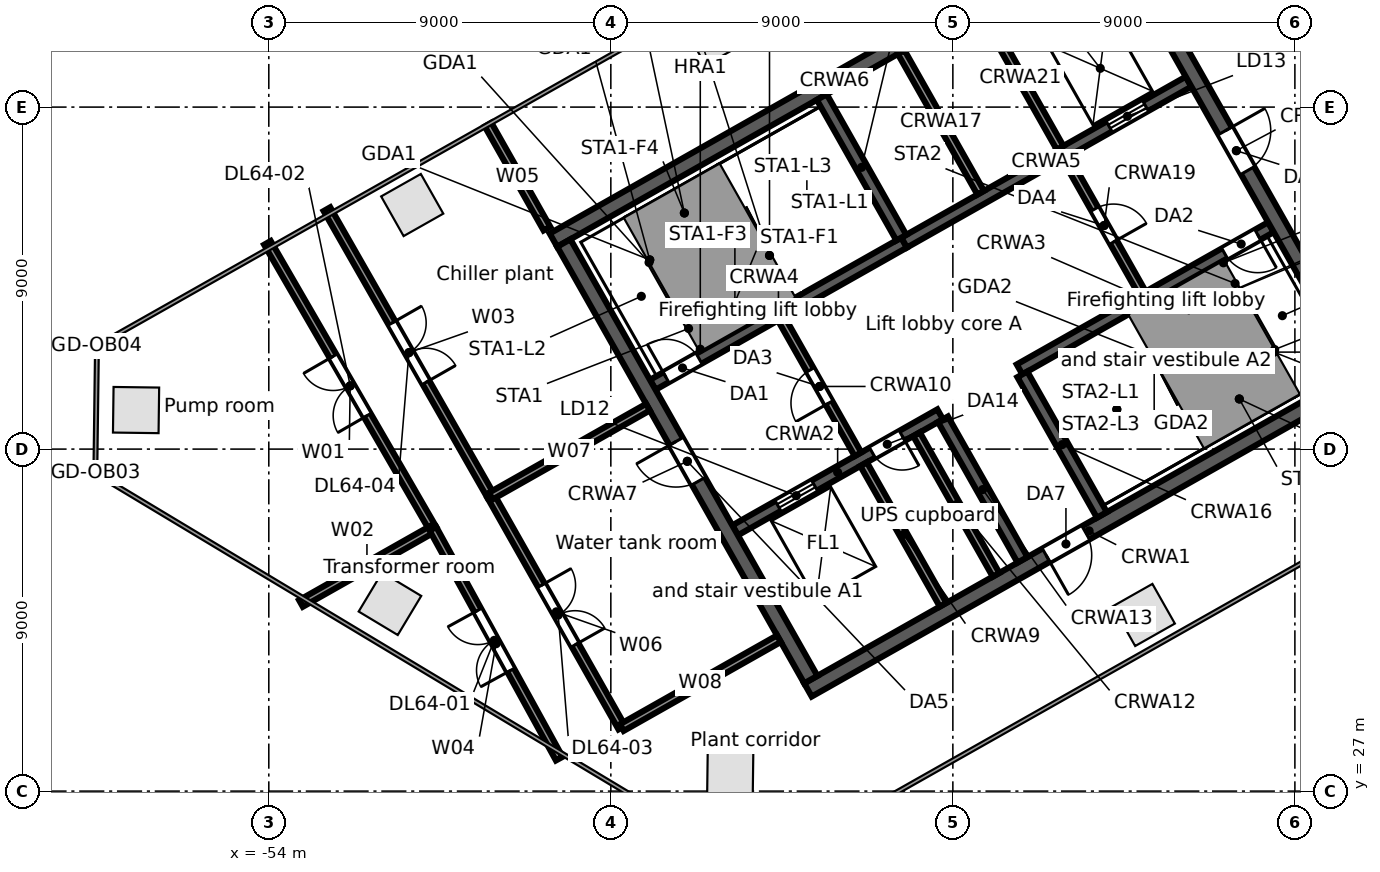
"""IFC4 building model, lengths in metres.
Left out: names, types, materials, properties, quantities, classifications, styles, units other than length and angle.
Written with IfcOpenShell. Run it as: python <this file> out.ifc"""

import sys

from ifc_helpers import new_model, si_unit, direction, frame, frame_2d, origin, origin_2d, place, context, subcontext, project, spatial, rectangle, extrude, element, fill, save


model = new_model("IFC4")
c1 = context("Model", 3, precision=1e-05, world=origin(), true_north=direction((0.0, 1.0)))
c2 = subcontext(c1, "Body", "Model", "MODEL_VIEW")
j1 = project(units=[si_unit("LENGTHUNIT", "METRE"), si_unit("PLANEANGLEUNIT", "RADIAN")], contexts=[c1])
p1 = place(None, origin())
s1 = spatial("IfcSite", under=j1, at=p1, CompositionType="ELEMENT")
p2 = place(p1, origin())
s2 = spatial("IfcBuilding", under=s1, at=p2, CompositionType="ELEMENT")
p3 = place(p2, frame((0.0, 0.0, 285.5)))
s3 = spatial("IfcBuildingStorey", under=s2, at=p3, CompositionType="ELEMENT", Elevation=285.5)
for number, where, z_axis, x_axis in (
    (1, (-42.28, 46.919, 0.0), (0.0, 0.0, 1.0), (-0.87, -0.492, 0.0)),
    (2, (-50.226, 42.423, 0.0), (0.0, 0.0, 1.0), (-0.87, -0.492, 0.0)),
    (3, (-57.493, 37.027, 0.0), (0.0, 0.0, 1.0), (-0.013, -1.0, 0.0)),
    (4, (-50.812, 31.931, 0.0), (0.0, 0.0, 1.0), (0.857, -0.515, 0.0)),
    (5, (-41.858, 27.495, 0.0), (0.0, 0.0, 1.0), (1.0, -0.013, 0.0)),
    (6, (-30.976, 31.635, 0.0), (0.0, 0.0, 1.0), (0.87, 0.492, 0.0)),
):
    element("IfcColumn", number, at=place(p3, frame(where, z_axis=z_axis, x_axis=x_axis)), inside=s3, PredefinedType="COLUMN", context=c2, shape_type="SweptSolid", body=[
        extrude(rectangle(XDim=1.2, YDim=1.2, at=origin_2d()), origin(), (0.0, 0.0, 1.0), 7.6),
    ])
p4 = place(p3, frame((-39.813, 29.662, 0.0), z_axis=(0.0, 0.0, 1.0), x_axis=(0.870350116061, 0.492433422375, 0.0)))
e7 = element("IfcWall", 7, at=p4, inside=s3, PredefinedType="SOLIDWALL", context=c2, shape_type="SweptSolid", body=[
    extrude(rectangle(XDim=17.0, YDim=0.4, at=frame_2d((8.5, 0.0))), origin(), (0.0, 0.0, 1.0), 7.32),
])
p5 = place(p4, frame((7.2, 0.0, 0.0)))
e8 = element("IfcOpeningElement", 8, at=p5, cuts=e7, PredefinedType="OPENING", context=c2, shape_type="SweptSolid", body=[
    extrude(rectangle(XDim=1.2, YDim=2.1, at=frame_2d((0.6, 1.05))), frame((0.0, 0.21, 0.0), z_axis=(0.0, -1.0, 0.0), x_axis=(1.0, 0.0, 0.0)), (0.0, 0.0, 1.0), 0.42),
])
p6 = place(p3, frame((-41.73, 33.863, 0.0), z_axis=(0.0, 0.0, 1.0), x_axis=(0.870350800578, 0.492432212525, 0.0)))
e9 = element("IfcWall", 9, at=p6, inside=s3, PredefinedType="SOLIDWALL", context=c2, shape_type="SweptSolid", body=[
    extrude(rectangle(XDim=6.2, YDim=0.3, at=frame_2d((3.1, 0.0))), origin(), (0.0, 0.0, 1.0), 7.32),
])
p7 = place(p6, frame((1.3, 0.0, 0.0)))
e10 = element("IfcOpeningElement", 10, at=p7, cuts=e9, PredefinedType="OPENING", context=c2, shape_type="SweptSolid", body=[
    extrude(rectangle(XDim=1.1, YDim=2.1, at=frame_2d((0.55, 1.05))), frame((0.0, 0.16, 0.0), z_axis=(0.0, -1.0, 0.0), x_axis=(1.0, 0.0, 0.0)), (0.0, 0.0, 1.0), 0.32),
])
p8 = place(p6, frame((4.15, 0.0, 0.0)))
e11 = element("IfcOpeningElement", 11, at=p8, cuts=e9, PredefinedType="OPENING", context=c2, shape_type="SweptSolid", body=[
    extrude(rectangle(XDim=0.9, YDim=2.1, at=frame_2d((0.45, 1.05))), frame((0.0, 0.16, 0.0), z_axis=(0.0, -1.0, 0.0), x_axis=(1.0, 0.0, 0.0)), (0.0, 0.0, 1.0), 0.32),
])
p9 = place(p3, frame((-34.245, 38.097, 0.0), z_axis=(0.0, 0.0, 1.0), x_axis=(0.870356351998, 0.492422400523, 0.0)))
e12 = element("IfcWall", 12, at=p9, inside=s3, PredefinedType="SOLIDWALL", context=c2, shape_type="SweptSolid", body=[
    extrude(rectangle(XDim=7.6, YDim=0.3, at=frame_2d((3.8, 0.0))), origin(), (0.0, 0.0, 1.0), 7.32),
])
p10 = place(p9, frame((6.2, 0.0, 0.0)))
e13 = element("IfcOpeningElement", 13, at=p10, cuts=e12, PredefinedType="OPENING", context=c2, shape_type="SweptSolid", body=[
    extrude(rectangle(XDim=1.0, YDim=2.1, at=frame_2d((0.5, 1.05))), frame((0.0, 0.16, 0.0), z_axis=(0.0, -1.0, 0.0), x_axis=(1.0, 0.0, 0.0)), (0.0, 0.0, 1.0), 0.32),
])
p11 = place(p3, frame((-43.897, 37.692, 0.0), z_axis=(0.0, 0.0, 1.0), x_axis=(0.870356351998, 0.492422400523, 0.0)))
e14 = element("IfcWall", 14, at=p11, inside=s3, PredefinedType="SOLIDWALL", context=c2, shape_type="SweptSolid", body=[
    extrude(rectangle(XDim=7.6, YDim=0.3, at=frame_2d((3.8, 0.0))), origin(), (0.0, 0.0, 1.0), 7.32),
])
p12 = place(p11, frame((0.4, 0.0, 0.0)))
e15 = element("IfcOpeningElement", 15, at=p12, cuts=e14, PredefinedType="OPENING", context=c2, shape_type="SweptSolid", body=[
    extrude(rectangle(XDim=1.0, YDim=2.1, at=frame_2d((0.5, 1.05))), frame((0.0, 0.16, 0.0), z_axis=(0.0, -1.0, 0.0), x_axis=(1.0, 0.0, 0.0)), (0.0, 0.0, 1.0), 0.32),
])
p13 = place(p3, frame((-37.282, 41.435, 0.0), z_axis=(0.0, 0.0, 1.0), x_axis=(0.870361315115, 0.492413628113, 0.0)))
e16 = element("IfcWall", 16, at=p13, inside=s3, PredefinedType="SOLIDWALL", context=c2, shape_type="SweptSolid", body=[
    extrude(rectangle(XDim=8.6, YDim=0.3, at=frame_2d((4.3, 0.0))), origin(), (0.0, 0.0, 1.0), 7.32),
])
p14 = place(p13, frame((6.2, 0.0, 0.0)))
e17 = element("IfcOpeningElement", 17, at=p14, cuts=e16, PredefinedType="OPENING", context=c2, shape_type="SweptSolid", body=[
    extrude(rectangle(XDim=1.1, YDim=2.1, at=frame_2d((0.55, 1.05))), frame((0.0, 0.16, 0.0), z_axis=(0.0, -1.0, 0.0), x_axis=(1.0, 0.0, 0.0)), (0.0, 0.0, 1.0), 0.32),
])
p15 = place(p3, frame((-46.51, 41.499, 0.0), z_axis=(0.0, 0.0, 1.0), x_axis=(0.870356271124, 0.492422543467, 0.0)))
e18 = element("IfcWall", 18, at=p15, inside=s3, PredefinedType="SOLIDWALL", context=c2, shape_type="SweptSolid", body=[
    extrude(rectangle(XDim=17.0, YDim=0.4, at=frame_2d((8.5, 0.0))), origin(), (0.0, 0.0, 1.0), 7.32),
])
p16 = place(p3, frame((-46.238, 41.423, 0.0), z_axis=(0.0, 0.0, 1.0), x_axis=(0.492421663121, -0.870356769198, 0.0)))
e19 = element("IfcWall", 19, at=p16, inside=s3, PredefinedType="SOLIDWALL", context=c2, shape_type="SweptSolid", body=[
    extrude(rectangle(XDim=13.2, YDim=0.4, at=frame_2d((6.6, 0.0))), origin(), (0.0, 0.0, 1.0), 7.32),
])
p17 = place(p16, frame((6.0, 0.0, 0.0)))
e20 = element("IfcOpeningElement", 20, at=p17, cuts=e19, PredefinedType="OPENING", context=c2, shape_type="SweptSolid", body=[
    extrude(rectangle(XDim=1.2, YDim=2.1, at=frame_2d((0.6, 1.05))), frame((0.0, 0.21, 0.0), z_axis=(0.0, -1.0, 0.0), x_axis=(1.0, 0.0, 0.0)), (0.0, 0.0, 1.0), 0.42),
])
p18 = place(p3, frame((-38.349, 35.603, 0.0), z_axis=(0.0, 0.0, 1.0), x_axis=(0.492397924348, -0.870370199454, 0.0)))
e21 = element("IfcWall", 21, at=p18, inside=s3, PredefinedType="SOLIDWALL", context=c2, shape_type="SweptSolid", body=[
    extrude(rectangle(XDim=4.25, YDim=0.2, at=frame_2d((2.125, 0.0))), origin(), (0.0, 0.0, 1.0), 7.32),
])
p19 = place(p3, frame((-40.516, 39.433, 0.0), z_axis=(0.0, 0.0, 1.0), x_axis=(0.492453559952, -0.87033872216, 0.0)))
e22 = element("IfcWall", 22, at=p19, inside=s3, PredefinedType="PARTITIONING", context=c2, shape_type="SweptSolid", body=[
    extrude(rectangle(XDim=4.1, YDim=0.2, at=frame_2d((2.05, 0.0))), origin(), (0.0, 0.0, 1.0), 7.32),
])
p20 = place(p19, frame((1.55, 0.0, 0.0)))
e23 = element("IfcOpeningElement", 23, at=p20, cuts=e22, PredefinedType="OPENING", context=c2, shape_type="SweptSolid", body=[
    extrude(rectangle(XDim=1.0, YDim=2.1, at=frame_2d((0.5, 1.05))), frame((0.0, 0.11, 0.0), z_axis=(0.0, -1.0, 0.0), x_axis=(1.0, 0.0, 0.0)), (0.0, 0.0, 1.0), 0.22),
])
p21 = place(p3, frame((-36.956, 36.391, 0.0), z_axis=(0.0, 0.0, 1.0), x_axis=(0.492397924348, -0.870370199454, 0.0)))
e24 = element("IfcWall", 24, at=p21, inside=s3, PredefinedType="SOLIDWALL", context=c2, shape_type="SweptSolid", body=[
    extrude(rectangle(XDim=4.25, YDim=0.2, at=frame_2d((2.125, 0.0))), origin(), (0.0, 0.0, 1.0), 7.32),
])
for number, where, z_axis, x_axis in (
    (25, (-36.26, 36.785, 0.0), (0.0, 0.0, 1.0), (0.492, -0.87, 0.0)),
    (26, (-39.449, 45.264, 0.0), (0.0, 0.0, 1.0), (0.492, -0.87, 0.0)),
    (27, (-34.171, 37.967, 0.0), (0.0, 0.0, 1.0), (0.492, -0.87, 0.0)),
):
    element("IfcWall", number, at=place(p3, frame(where, z_axis=z_axis, x_axis=x_axis)), inside=s3, PredefinedType="SOLIDWALL", context=c2, shape_type="SweptSolid", body=[
        extrude(rectangle(XDim=4.25, YDim=0.3, at=frame_2d((2.125, 0.0))), origin(), (0.0, 0.0, 1.0), 7.32),
    ])
p22 = place(p3, frame((-37.36, 46.446, 0.0), z_axis=(0.0, 0.0, 1.0), x_axis=(0.492422543467, -0.870356271124, 0.0)))
e28 = element("IfcWall", 28, at=p22, inside=s3, PredefinedType="SOLIDWALL", context=c2, shape_type="SweptSolid", body=[
    extrude(rectangle(XDim=4.25, YDim=0.2, at=frame_2d((2.125, 0.0))), origin(), (0.0, 0.0, 1.0), 7.32),
])
p23 = place(p3, frame((-33.031, 43.667, 0.0), z_axis=(0.0, 0.0, 1.0), x_axis=(0.492408451753, -0.87036424366, 0.0)))
e29 = element("IfcWall", 29, at=p23, inside=s3, PredefinedType="PARTITIONING", context=c2, shape_type="SweptSolid", body=[
    extrude(rectangle(XDim=4.1, YDim=0.2, at=frame_2d((2.05, 0.0))), origin(), (0.0, 0.0, 1.0), 7.32),
])
p24 = place(p23, frame((1.55, 0.0, 0.0)))
e30 = element("IfcOpeningElement", 30, at=p24, cuts=e29, PredefinedType="OPENING", context=c2, shape_type="SweptSolid", body=[
    extrude(rectangle(XDim=1.0, YDim=2.1, at=frame_2d((0.5, 1.05))), frame((0.0, 0.11, 0.0), z_axis=(0.0, -1.0, 0.0), x_axis=(1.0, 0.0, 0.0)), (0.0, 0.0, 1.0), 0.22),
])
p25 = place(p3, frame((-35.271, 47.628, 0.0), z_axis=(0.0, 0.0, 1.0), x_axis=(0.492422543467, -0.870356271124, 0.0)))
e31 = element("IfcWall", 31, at=p25, inside=s3, PredefinedType="SOLIDWALL", context=c2, shape_type="SweptSolid", body=[
    extrude(rectangle(XDim=4.25, YDim=0.2, at=frame_2d((2.125, 0.0))), origin(), (0.0, 0.0, 1.0), 7.32),
])
p26 = place(p3, frame((-31.79, 49.597, 0.0), z_axis=(0.0, 0.0, 1.0), x_axis=(0.492421663121, -0.870356769198, 0.0)))
e32 = element("IfcWall", 32, at=p26, inside=s3, PredefinedType="SOLIDWALL", context=c2, shape_type="SweptSolid", body=[
    extrude(rectangle(XDim=13.2, YDim=0.4, at=frame_2d((6.6, 0.0))), origin(), (0.0, 0.0, 1.0), 7.32),
])
p27 = place(p26, frame((6.0, 0.0, 0.0)))
e33 = element("IfcOpeningElement", 33, at=p27, cuts=e32, PredefinedType="OPENING", context=c2, shape_type="SweptSolid", body=[
    extrude(rectangle(XDim=1.2, YDim=2.1, at=frame_2d((0.6, 1.05))), frame((0.0, 0.21, 0.0), z_axis=(0.0, -1.0, 0.0), x_axis=(1.0, 0.0, 0.0)), (0.0, 0.0, 1.0), 0.42),
])
p28 = place(p3, frame((-54.036, 41.428, 0.0), z_axis=(0.0, 0.0, 1.0), x_axis=(0.500903434797, -0.865503176775, 0.0)))
e34 = element("IfcWall", 34, at=p28, inside=s3, PredefinedType="PARTITIONING", context=c2, shape_type="SweptSolid", body=[
    extrude(rectangle(XDim=8.694, YDim=0.2, at=frame_2d((4.347, 0.0))), origin(), (0.0, 0.0, 1.0), 6.694),
])
p29 = place(p28, frame((3.45, 0.0, 0.0)))
e35 = element("IfcOpeningElement", 35, at=p29, cuts=e34, PredefinedType="OPENING", context=c2, shape_type="SweptSolid", body=[
    extrude(rectangle(XDim=1.8, YDim=2.1, at=frame_2d((0.9, 1.05))), frame((0.0, 0.11, 0.0), z_axis=(0.0, -1.0, 0.0), x_axis=(1.0, 0.0, 0.0)), (0.0, 0.0, 1.0), 0.22),
])
p30 = place(p3, frame((-53.154, 31.938, 0.0), z_axis=(0.0, 0.0, 1.0), x_axis=(0.870347398057, 0.492438226273, 0.0)))
e36 = element("IfcWall", 36, at=p30, inside=s3, PredefinedType="PARTITIONING", context=c2, shape_type="SweptSolid", body=[
    extrude(rectangle(XDim=3.99, YDim=0.2, at=frame_2d((1.995, 0.0))), origin(), (0.0, 0.0, 1.0), 6.7),
])
p31 = place(p3, frame((-52.47, 42.314, 0.0), z_axis=(0.0, 0.0, 1.0), x_axis=(0.495939345118, -0.868357164975, 0.0)))
e37 = element("IfcWall", 37, at=p31, inside=s3, PredefinedType="PARTITIONING", context=c2, shape_type="SweptSolid", body=[
    extrude(rectangle(XDim=8.695, YDim=0.2, at=frame_2d((4.347, 0.0))), origin(), (0.0, 0.0, 1.0), 6.694),
])
p32 = place(p31, frame((3.45, 0.0, 0.0)))
e38 = element("IfcOpeningElement", 38, at=p32, cuts=e37, PredefinedType="OPENING", context=c2, shape_type="SweptSolid", body=[
    extrude(rectangle(XDim=1.8, YDim=2.1, at=frame_2d((0.9, 1.05))), frame((0.0, 0.11, 0.0), z_axis=(0.0, -1.0, 0.0), x_axis=(1.0, 0.0, 0.0)), (0.0, 0.0, 1.0), 0.22),
])
p33 = place(p3, frame((-49.681, 33.903, 0.0), z_axis=(0.0, 0.0, 1.0), x_axis=(0.48158332994, -0.876400305981, 0.0)))
e39 = element("IfcWall", 39, at=p33, inside=s3, PredefinedType="PARTITIONING", context=c2, shape_type="SweptSolid", body=[
    extrude(rectangle(XDim=6.902, YDim=0.2, at=frame_2d((3.451, 0.0))), origin(), (0.0, 0.0, 1.0), 6.6),
])
p34 = place(p33, frame((2.45, 0.0, 0.0)))
e40 = element("IfcOpeningElement", 40, at=p34, cuts=e39, PredefinedType="OPENING", context=c2, shape_type="SweptSolid", body=[
    extrude(rectangle(XDim=1.8, YDim=2.1, at=frame_2d((0.9, 1.05))), frame((0.0, 0.11, 0.0), z_axis=(0.0, -1.0, 0.0), x_axis=(1.0, 0.0, 0.0)), (0.0, 0.0, 1.0), 0.22),
])
p35 = place(p3, frame((-48.231, 44.54, 0.0), z_axis=(0.0, 0.0, 1.0), x_axis=(0.49254830201, -0.870285108563, 0.0)))
e41 = element("IfcWall", 41, at=p35, inside=s3, PredefinedType="PARTITIONING", context=c2, shape_type="SweptSolid", body=[
    extrude(rectangle(XDim=3.145, YDim=0.2, at=frame_2d((1.573, 0.0))), origin(), (0.0, 0.0, 1.0), 6.688),
])
p36 = place(p3, frame((-48.158, 34.764, 0.0), z_axis=(0.0, 0.0, 1.0), x_axis=(0.492472114048, -0.870328223652, 0.0)))
e42 = element("IfcWall", 42, at=p36, inside=s3, PredefinedType="PARTITIONING", context=c2, shape_type="SweptSolid", body=[
    extrude(rectangle(XDim=7.0, YDim=0.2, at=frame_2d((3.5, 0.0))), origin(), (0.0, 0.0, 1.0), 6.6),
])
p37 = place(p36, frame((2.7, 0.0, 0.0)))
e43 = element("IfcOpeningElement", 43, at=p37, cuts=e42, PredefinedType="OPENING", context=c2, shape_type="SweptSolid", body=[
    extrude(rectangle(XDim=1.8, YDim=2.1, at=frame_2d((0.9, 1.05))), frame((0.0, 0.11, 0.0), z_axis=(0.0, -1.0, 0.0), x_axis=(1.0, 0.0, 0.0)), (0.0, 0.0, 1.0), 0.22),
])
for number, where, z_axis, x_axis in (
    (44, (-48.158, 34.764, 0.0), (0.0, 0.0, 1.0), (0.87, 0.492, 0.0)),
    (45, (-44.711, 28.672, 0.0), (0.0, 0.0, 1.0), (0.87, 0.492, 0.0)),
):
    element("IfcWall", number, at=place(p3, frame(where, z_axis=z_axis, x_axis=x_axis)), inside=s3, PredefinedType="PARTITIONING", context=c2, shape_type="SweptSolid", body=[
        extrude(rectangle(XDim=4.751, YDim=0.2, at=frame_2d((2.375, 0.0))), origin(), (0.0, 0.0, 1.0), 6.6),
    ])
p38 = place(p14, origin())
e46 = element("IfcDoor", 46, at=p38, inside=s3, OperationType="DOUBLE_DOOR_SLIDING", PredefinedType="DOOR", context=c2, shape_type="SweptSolid", body=[
    extrude(rectangle(XDim=1.1, YDim=2.1, at=frame_2d((0.55, 1.05))), frame((0.0, 0.025, 0.0), z_axis=(0.0, -1.0, 0.0), x_axis=(1.0, 0.0, 0.0)), (0.0, 0.0, 1.0), 0.05),
])
fill(e17, e46)
p39 = place(p7, origin())
e47 = element("IfcDoor", 47, at=p39, inside=s3, OperationType="DOUBLE_DOOR_SLIDING", PredefinedType="DOOR", context=c2, shape_type="SweptSolid", body=[
    extrude(rectangle(XDim=1.1, YDim=2.1, at=frame_2d((0.55, 1.05))), frame((0.0, 0.025, 0.0), z_axis=(0.0, -1.0, 0.0), x_axis=(1.0, 0.0, 0.0)), (0.0, 0.0, 1.0), 0.05),
])
fill(e10, e47)
p40 = place(p12, origin())
e48 = element("IfcDoor", 48, at=p40, inside=s3, OperationType="SINGLE_SWING_LEFT", PredefinedType="DOOR", context=c2, shape_type="SweptSolid", body=[
    extrude(rectangle(XDim=1.0, YDim=2.1, at=frame_2d((0.5, 1.05))), frame((0.0, 0.025, 0.0), z_axis=(0.0, -1.0, 0.0), x_axis=(1.0, 0.0, 0.0)), (0.0, 0.0, 1.0), 0.05),
])
fill(e15, e48)
p41 = place(p10, frame((1.0, 0.0, 0.0), z_axis=(0.0, 0.0, 1.0), x_axis=(-1.0, 0.0, 0.0)))
e49 = element("IfcDoor", 49, at=p41, inside=s3, OperationType="SINGLE_SWING_LEFT", PredefinedType="DOOR", context=c2, shape_type="SweptSolid", body=[
    extrude(rectangle(XDim=1.0, YDim=2.1, at=frame_2d((0.5, 1.05))), frame((0.0, 0.025, 0.0), z_axis=(0.0, -1.0, 0.0), x_axis=(1.0, 0.0, 0.0)), (0.0, 0.0, 1.0), 0.05),
])
fill(e13, e49)
p42 = place(p20, frame((1.0, 0.0, 0.0), z_axis=(0.0, 0.0, 1.0), x_axis=(-1.0, 0.0, 0.0)))
e50 = element("IfcDoor", 50, at=p42, inside=s3, OperationType="SINGLE_SWING_LEFT", PredefinedType="DOOR", context=c2, shape_type="SweptSolid", body=[
    extrude(rectangle(XDim=1.0, YDim=2.1, at=frame_2d((0.5, 1.05))), frame((0.0, 0.025, 0.0), z_axis=(0.0, -1.0, 0.0), x_axis=(1.0, 0.0, 0.0)), (0.0, 0.0, 1.0), 0.05),
])
fill(e23, e50)
p43 = place(p17, frame((1.2, 0.0, 0.0), z_axis=(0.0, 0.0, 1.0), x_axis=(-1.0, 0.0, 0.0)))
e51 = element("IfcDoor", 51, at=p43, inside=s3, OperationType="SINGLE_SWING_RIGHT", PredefinedType="DOOR", context=c2, shape_type="SweptSolid", body=[
    extrude(rectangle(XDim=1.2, YDim=2.1, at=frame_2d((0.6, 1.05))), frame((0.0, 0.025, 0.0), z_axis=(0.0, -1.0, 0.0), x_axis=(1.0, 0.0, 0.0)), (0.0, 0.0, 1.0), 0.05),
])
fill(e20, e51)
p44 = place(p24, origin())
e52 = element("IfcDoor", 52, at=p44, inside=s3, OperationType="SINGLE_SWING_RIGHT", PredefinedType="DOOR", context=c2, shape_type="SweptSolid", body=[
    extrude(rectangle(XDim=1.0, YDim=2.1, at=frame_2d((0.5, 1.05))), frame((0.0, 0.025, 0.0), z_axis=(0.0, -1.0, 0.0), x_axis=(1.0, 0.0, 0.0)), (0.0, 0.0, 1.0), 0.05),
])
fill(e30, e52)
p45 = place(p27, origin())
e53 = element("IfcDoor", 53, at=p45, inside=s3, OperationType="SINGLE_SWING_LEFT", PredefinedType="DOOR", context=c2, shape_type="SweptSolid", body=[
    extrude(rectangle(XDim=1.2, YDim=2.1, at=frame_2d((0.6, 1.05))), frame((0.0, 0.025, 0.0), z_axis=(0.0, -1.0, 0.0), x_axis=(1.0, 0.0, 0.0)), (0.0, 0.0, 1.0), 0.05),
])
fill(e33, e53)
p46 = place(p5, frame((1.2, 0.0, 0.0), z_axis=(0.0, 0.0, 1.0), x_axis=(-1.0, 0.0, 0.0)))
e54 = element("IfcDoor", 54, at=p46, inside=s3, OperationType="SINGLE_SWING_RIGHT", PredefinedType="DOOR", context=c2, shape_type="SweptSolid", body=[
    extrude(rectangle(XDim=1.2, YDim=2.1, at=frame_2d((0.6, 1.05))), frame((0.0, 0.025, 0.0), z_axis=(0.0, -1.0, 0.0), x_axis=(1.0, 0.0, 0.0)), (0.0, 0.0, 1.0), 0.05),
])
fill(e8, e54)
p47 = place(p8, frame((0.9, 0.0, 0.0), z_axis=(0.0, 0.0, 1.0), x_axis=(-1.0, 0.0, 0.0)))
e55 = element("IfcDoor", 55, at=p47, inside=s3, OperationType="SINGLE_SWING_LEFT", PredefinedType="DOOR", context=c2, shape_type="SweptSolid", body=[
    extrude(rectangle(XDim=0.9, YDim=2.1, at=frame_2d((0.45, 1.05))), frame((0.0, 0.025, 0.0), z_axis=(0.0, -1.0, 0.0), x_axis=(1.0, 0.0, 0.0)), (0.0, 0.0, 1.0), 0.05),
])
fill(e11, e55)
p48 = place(p34, frame((1.8, 0.0, 0.0), z_axis=(0.0, 0.0, 1.0), x_axis=(-1.0, 0.0, 0.0)))
e56 = element("IfcDoor", 56, at=p48, inside=s3, OperationType="DOUBLE_DOOR_SINGLE_SWING", PredefinedType="DOOR", context=c2, shape_type="SweptSolid", body=[
    extrude(rectangle(XDim=1.8, YDim=2.1, at=frame_2d((0.9, 1.05))), frame((0.0, 0.025, 0.0), z_axis=(0.0, -1.0, 0.0), x_axis=(1.0, 0.0, 0.0)), (0.0, 0.0, 1.0), 0.05),
])
fill(e40, e56)
p49 = place(p29, frame((1.8, 0.0, 0.0), z_axis=(0.0, 0.0, 1.0), x_axis=(-1.0, 0.0, 0.0)))
e57 = element("IfcDoor", 57, at=p49, inside=s3, OperationType="DOUBLE_DOOR_SINGLE_SWING", PredefinedType="DOOR", context=c2, shape_type="SweptSolid", body=[
    extrude(rectangle(XDim=1.8, YDim=2.1, at=frame_2d((0.9, 1.05))), frame((0.0, 0.025, 0.0), z_axis=(0.0, -1.0, 0.0), x_axis=(1.0, 0.0, 0.0)), (0.0, 0.0, 1.0), 0.05),
])
fill(e35, e57)
p50 = place(p37, origin())
e58 = element("IfcDoor", 58, at=p50, inside=s3, OperationType="DOUBLE_DOOR_SINGLE_SWING", PredefinedType="DOOR", context=c2, shape_type="SweptSolid", body=[
    extrude(rectangle(XDim=1.8, YDim=2.1, at=frame_2d((0.9, 1.05))), frame((0.0, 0.025, 0.0), z_axis=(0.0, -1.0, 0.0), x_axis=(1.0, 0.0, 0.0)), (0.0, 0.0, 1.0), 0.05),
])
fill(e43, e58)
p51 = place(p32, origin())
e59 = element("IfcDoor", 59, at=p51, inside=s3, OperationType="DOUBLE_DOOR_SINGLE_SWING", PredefinedType="DOOR", context=c2, shape_type="SweptSolid", body=[
    extrude(rectangle(XDim=1.8, YDim=2.1, at=frame_2d((0.9, 1.05))), frame((0.0, 0.025, 0.0), z_axis=(0.0, -1.0, 0.0), x_axis=(1.0, 0.0, 0.0)), (0.0, 0.0, 1.0), 0.05),
])
fill(e38, e59)
save(model, sys.argv[1])
